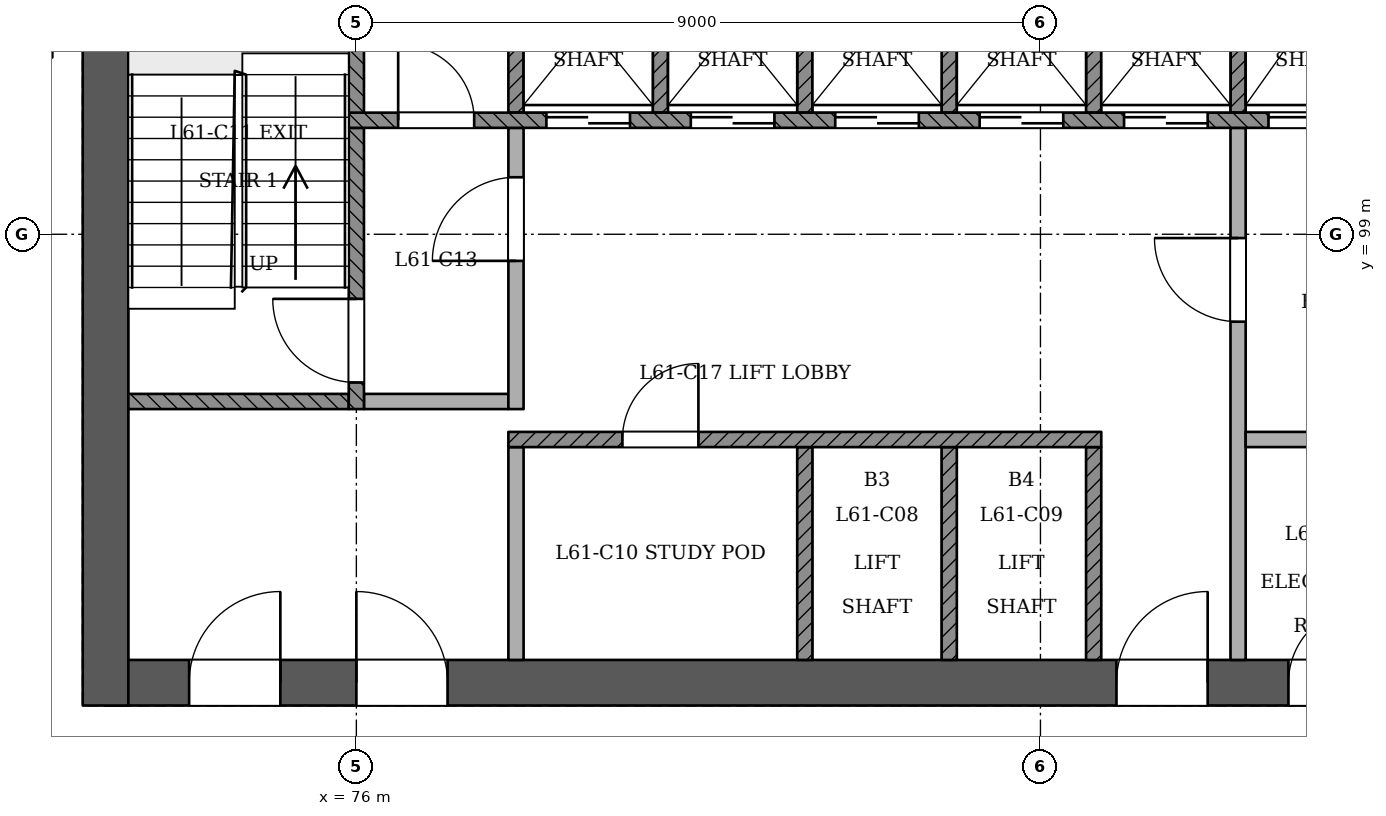
"""IFC4 building model, lengths in metres.
Left out: names, types, materials, properties, quantities, classifications, styles, units other than length and angle.
Written with IfcOpenShell. Run it as: python <this file> out.ifc"""

import sys

from ifc_helpers import new_model, si_unit, direction, frame, frame_2d, origin, place, context, subcontext, project, spatial, rectangle, extrude, element, fill, save


model = new_model("IFC4")
c1 = context("Model", 3, precision=1e-05, world=origin(), true_north=direction((0.0, 1.0)))
c2 = subcontext(c1, "Body", "Model", "MODEL_VIEW")
j1 = project(units=[si_unit("LENGTHUNIT", "METRE"), si_unit("PLANEANGLEUNIT", "RADIAN")], contexts=[c1])
p1 = place(None, origin())
s1 = spatial("IfcSite", under=j1, at=p1, CompositionType="ELEMENT")
p2 = place(p1, origin())
s2 = spatial("IfcBuilding", under=s1, at=p2, CompositionType="ELEMENT")
p3 = place(p2, frame((0.0, 0.0, 239.2)))
s3 = spatial("IfcBuildingStorey", under=s2, at=p3, CompositionType="ELEMENT", Elevation=239.2)
p4 = place(p3, frame((72.7, 93.1, 0.0), z_axis=(0.0, 0.0, 1.0), x_axis=(1.0, 0.0, 0.0)))
e1 = element("IfcWall", 1, at=p4, inside=s3, PredefinedType="SHEAR", context=c2, shape_type="SweptSolid", body=[
    extrude(rectangle(XDim=24.9, YDim=0.6, at=frame_2d((12.45, 0.0))), origin(), (0.0, 0.0, 1.0), 3.6),
])
p5 = place(p4, frame((1.1, 0.0, 0.0)))
e2 = element("IfcOpeningElement", 2, at=p5, cuts=e1, PredefinedType="OPENING", context=c2, shape_type="SweptSolid", body=[
    extrude(rectangle(XDim=1.2, YDim=2.1, at=frame_2d((0.6, 1.05))), frame((0.0, 0.311, 0.0), z_axis=(0.0, -1.0, 0.0), x_axis=(1.0, 0.0, 0.0)), (0.0, 0.0, 1.0), 0.621),
])
p6 = place(p4, frame((3.3, 0.0, 0.0)))
e3 = element("IfcOpeningElement", 3, at=p6, cuts=e1, PredefinedType="OPENING", context=c2, shape_type="SweptSolid", body=[
    extrude(rectangle(XDim=1.2, YDim=2.1, at=frame_2d((0.6, 1.05))), frame((0.0, 0.311, 0.0), z_axis=(0.0, -1.0, 0.0), x_axis=(1.0, 0.0, 0.0)), (0.0, 0.0, 1.0), 0.621),
])
p7 = place(p4, frame((13.3, 0.0, 0.0)))
e4 = element("IfcOpeningElement", 4, at=p7, cuts=e1, PredefinedType="OPENING", context=c2, shape_type="SweptSolid", body=[
    extrude(rectangle(XDim=1.2, YDim=2.1, at=frame_2d((0.6, 1.05))), frame((0.0, 0.311, 0.0), z_axis=(0.0, -1.0, 0.0), x_axis=(1.0, 0.0, 0.0)), (0.0, 0.0, 1.0), 0.621),
])
p8 = place(p4, frame((15.562, 0.0, 0.0)))
e5 = element("IfcOpeningElement", 5, at=p8, cuts=e1, PredefinedType="OPENING", context=c2, shape_type="SweptSolid", body=[
    extrude(rectangle(XDim=1.0, YDim=2.1, at=frame_2d((0.5, 1.05))), frame((0.0, 0.311, 0.0), z_axis=(0.0, -1.0, 0.0), x_axis=(1.0, 0.0, 0.0)), (0.0, 0.0, 1.0), 0.621),
])
p9 = place(p4, frame((18.2, 0.0, 0.0)))
e6 = element("IfcOpeningElement", 6, at=p9, cuts=e1, PredefinedType="OPENING", context=c2, shape_type="SweptSolid", body=[
    extrude(rectangle(XDim=1.0, YDim=2.1, at=frame_2d((0.5, 1.05))), frame((0.0, 0.311, 0.0), z_axis=(0.0, -1.0, 0.0), x_axis=(1.0, 0.0, 0.0)), (0.0, 0.0, 1.0), 0.621),
])
p10 = place(p4, frame((21.788, 0.0, 0.0)))
e7 = element("IfcOpeningElement", 7, at=p10, cuts=e1, PredefinedType="OPENING", context=c2, shape_type="SweptSolid", body=[
    extrude(rectangle(XDim=1.0, YDim=2.1, at=frame_2d((0.5, 1.05))), frame((0.0, 0.311, 0.0), z_axis=(0.0, -1.0, 0.0), x_axis=(1.0, 0.0, 0.0)), (0.0, 0.0, 1.0), 0.621),
])
p11 = place(p3, frame((72.7, 103.7, 0.0), z_axis=(0.0, 0.0, 1.0), x_axis=(0.0, -1.0, 0.0)))
e8 = element("IfcWall", 8, at=p11, inside=s3, PredefinedType="SHEAR", context=c2, shape_type="SweptSolid", body=[
    extrude(rectangle(XDim=10.9, YDim=0.6, at=frame_2d((5.45, 0.0))), origin(), (0.0, 0.0, 1.0), 3.6),
])
p12 = place(p3, frame((72.0, 101.4, 0.0), z_axis=(0.0, 0.0, 1.0), x_axis=(-1.0, 0.0, 0.0)))
e9 = element("IfcWall", 9, at=p12, inside=s3, PredefinedType="PARTITIONING", context=c2, shape_type="SweptSolid", body=[
    extrude(rectangle(XDim=1.8, YDim=0.15, at=frame_2d((0.9, 0.0))), origin(), (0.0, 0.0, 1.0), 3.2),
])
p13 = place(p3, frame((78.1, 93.4, 0.0), z_axis=(0.0, 0.0, 1.0), x_axis=(0.0, 1.0, 0.0)))
e10 = element("IfcWall", 10, at=p13, inside=s3, PredefinedType="PARTITIONING", context=c2, shape_type="SweptSolid", body=[
    extrude(rectangle(XDim=2.8, YDim=0.2, at=frame_2d((1.4, 0.0))), origin(), (0.0, 0.0, 1.0), 3.2),
])
for number, where, z_axis, x_axis in (
    (11, (81.9, 93.4, 0.0), (0.0, 0.0, 1.0), (0.0, 1.0, 0.0)),
    (12, (83.8, 93.4, 0.0), (0.0, 0.0, 1.0), (0.0, 1.0, 0.0)),
    (13, (85.7, 93.4, 0.0), (0.0, 0.0, 1.0), (0.0, 1.0, 0.0)),
):
    element("IfcWall", number, at=place(p3, frame(where, z_axis=z_axis, x_axis=x_axis)), inside=s3, PredefinedType="SOLIDWALL", context=c2, shape_type="SweptSolid", body=[
        extrude(rectangle(XDim=2.8, YDim=0.2, at=frame_2d((1.4, 0.0))), origin(), (0.0, 0.0, 1.0), 3.2),
    ])
p14 = place(p3, frame((87.6, 93.4, 0.0), z_axis=(0.0, 0.0, 1.0), x_axis=(0.0, 1.0, 0.0)))
e14 = element("IfcWall", 14, at=p14, inside=s3, PredefinedType="PARTITIONING", context=c2, shape_type="SweptSolid", body=[
    extrude(rectangle(XDim=7.0, YDim=0.2, at=frame_2d((3.5, 0.0))), origin(), (0.0, 0.0, 1.0), 3.2),
])
p15 = place(p14, frame((4.45, 0.0, 0.0)))
e15 = element("IfcOpeningElement", 15, at=p15, cuts=e14, PredefinedType="OPENING", context=c2, shape_type="SweptSolid", body=[
    extrude(rectangle(XDim=1.1, YDim=2.1, at=frame_2d((0.55, 1.05))), frame((0.0, 0.11, 0.0), z_axis=(0.0, -1.0, 0.0), x_axis=(1.0, 0.0, 0.0)), (0.0, 0.0, 1.0), 0.221),
])
p16 = place(p3, frame((78.0, 96.3, 0.0), z_axis=(0.0, 0.0, 1.0), x_axis=(1.0, 0.0, 0.0)))
e16 = element("IfcWall", 16, at=p16, inside=s3, PredefinedType="SOLIDWALL", context=c2, shape_type="SweptSolid", body=[
    extrude(rectangle(XDim=7.8, YDim=0.2, at=frame_2d((3.9, 0.0))), origin(), (0.0, 0.0, 1.0), 3.2),
])
p17 = place(p16, frame((1.5, 0.0, 0.0)))
e17 = element("IfcOpeningElement", 17, at=p17, cuts=e16, PredefinedType="OPENING", context=c2, shape_type="SweptSolid", body=[
    extrude(rectangle(XDim=1.0, YDim=2.1, at=frame_2d((0.5, 1.05))), frame((0.0, 0.11, 0.0), z_axis=(0.0, -1.0, 0.0), x_axis=(1.0, 0.0, 0.0)), (0.0, 0.0, 1.0), 0.221),
])
p18 = place(p3, frame((87.7, 96.3, 0.0), z_axis=(0.0, 0.0, 1.0), x_axis=(1.0, 0.0, 0.0)))
e18 = element("IfcWall", 18, at=p18, inside=s3, PredefinedType="PARTITIONING", context=c2, shape_type="SweptSolid", body=[
    extrude(rectangle(XDim=3.6, YDim=0.2, at=frame_2d((1.8, 0.0))), origin(), (0.0, 0.0, 1.0), 3.2),
])
p19 = place(p3, frame((73.0, 96.8, 0.0), z_axis=(0.0, 0.0, 1.0), x_axis=(1.0, 0.0, 0.0)))
e19 = element("IfcWall", 19, at=p19, inside=s3, PredefinedType="SOLIDWALL", context=c2, shape_type="SweptSolid", body=[
    extrude(rectangle(XDim=2.9, YDim=0.2, at=frame_2d((1.45, 0.0))), origin(), (0.0, 0.0, 1.0), 3.2),
])
p20 = place(p3, frame((76.0, 96.7, 0.0), z_axis=(0.0, 0.0, 1.0), x_axis=(0.0, 1.0, 0.0)))
e20 = element("IfcWall", 20, at=p20, inside=s3, PredefinedType="SOLIDWALL", context=c2, shape_type="SweptSolid", body=[
    extrude(rectangle(XDim=3.7, YDim=0.2, at=frame_2d((1.85, 0.0))), origin(), (0.0, 0.0, 1.0), 3.2),
])
p21 = place(p20, frame((0.35, 0.0, 0.0)))
e21 = element("IfcOpeningElement", 21, at=p21, cuts=e20, PredefinedType="OPENING", context=c2, shape_type="SweptSolid", body=[
    extrude(rectangle(XDim=1.1, YDim=2.1, at=frame_2d((0.55, 1.05))), frame((0.0, 0.11, 0.0), z_axis=(0.0, -1.0, 0.0), x_axis=(1.0, 0.0, 0.0)), (0.0, 0.0, 1.0), 0.221),
])
p22 = place(p3, frame((76.1, 96.8, 0.0), z_axis=(0.0, 0.0, 1.0), x_axis=(1.0, 0.0, 0.0)))
e22 = element("IfcWall", 22, at=p22, inside=s3, PredefinedType="PARTITIONING", context=c2, shape_type="SweptSolid", body=[
    extrude(rectangle(XDim=1.9, YDim=0.2, at=frame_2d((0.95, 0.0))), origin(), (0.0, 0.0, 1.0), 3.2),
])
p23 = place(p3, frame((78.1, 96.7, 0.0), z_axis=(0.0, 0.0, 1.0), x_axis=(0.0, 1.0, 0.0)))
e23 = element("IfcWall", 23, at=p23, inside=s3, PredefinedType="PARTITIONING", context=c2, shape_type="SweptSolid", body=[
    extrude(rectangle(XDim=3.7, YDim=0.2, at=frame_2d((1.85, 0.0))), origin(), (0.0, 0.0, 1.0), 3.2),
])
p24 = place(p23, frame((1.95, 0.0, 0.0)))
e24 = element("IfcOpeningElement", 24, at=p24, cuts=e23, PredefinedType="OPENING", context=c2, shape_type="SweptSolid", body=[
    extrude(rectangle(XDim=1.1, YDim=2.1, at=frame_2d((0.55, 1.05))), frame((0.0, 0.11, 0.0), z_axis=(0.0, -1.0, 0.0), x_axis=(1.0, 0.0, 0.0)), (0.0, 0.0, 1.0), 0.221),
])
p25 = place(p3, frame((75.9, 100.5, 0.0), z_axis=(0.0, 0.0, 1.0), x_axis=(1.0, 0.0, 0.0)))
e25 = element("IfcWall", 25, at=p25, inside=s3, PredefinedType="SOLIDWALL", context=c2, shape_type="SweptSolid", body=[
    extrude(rectangle(XDim=18.2, YDim=0.2, at=frame_2d((9.1, 0.0))), origin(), (0.0, 0.0, 1.0), 3.2),
])
p26 = place(p25, frame((2.6, 0.0, 0.0)))
e26 = element("IfcOpeningElement", 26, at=p26, cuts=e25, PredefinedType="OPENING", context=c2, shape_type="SweptSolid", body=[
    extrude(rectangle(XDim=1.1, YDim=2.1, at=frame_2d((0.55, 1.05))), frame((0.0, 0.11, 0.0), z_axis=(0.0, -1.0, 0.0), x_axis=(1.0, 0.0, 0.0)), (0.0, 0.0, 1.0), 0.221),
])
p27 = place(p25, frame((4.5, 0.0, 0.0)))
e27 = element("IfcOpeningElement", 27, at=p27, cuts=e25, PredefinedType="OPENING", context=c2, shape_type="SweptSolid", body=[
    extrude(rectangle(XDim=1.1, YDim=2.1, at=frame_2d((0.55, 1.05))), frame((0.0, 0.11, 0.0), z_axis=(0.0, -1.0, 0.0), x_axis=(1.0, 0.0, 0.0)), (0.0, 0.0, 1.0), 0.221),
])
p28 = place(p25, frame((6.4, 0.0, 0.0)))
e28 = element("IfcOpeningElement", 28, at=p28, cuts=e25, PredefinedType="OPENING", context=c2, shape_type="SweptSolid", body=[
    extrude(rectangle(XDim=1.1, YDim=2.1, at=frame_2d((0.55, 1.05))), frame((0.0, 0.11, 0.0), z_axis=(0.0, -1.0, 0.0), x_axis=(1.0, 0.0, 0.0)), (0.0, 0.0, 1.0), 0.221),
])
p29 = place(p25, frame((8.3, 0.0, 0.0)))
e29 = element("IfcOpeningElement", 29, at=p29, cuts=e25, PredefinedType="OPENING", context=c2, shape_type="SweptSolid", body=[
    extrude(rectangle(XDim=1.1, YDim=2.1, at=frame_2d((0.55, 1.05))), frame((0.0, 0.11, 0.0), z_axis=(0.0, -1.0, 0.0), x_axis=(1.0, 0.0, 0.0)), (0.0, 0.0, 1.0), 0.221),
])
p30 = place(p25, frame((10.2, 0.0, 0.0)))
e30 = element("IfcOpeningElement", 30, at=p30, cuts=e25, PredefinedType="OPENING", context=c2, shape_type="SweptSolid", body=[
    extrude(rectangle(XDim=1.1, YDim=2.1, at=frame_2d((0.55, 1.05))), frame((0.0, 0.11, 0.0), z_axis=(0.0, -1.0, 0.0), x_axis=(1.0, 0.0, 0.0)), (0.0, 0.0, 1.0), 0.221),
])
p31 = place(p25, frame((12.1, 0.0, 0.0)))
e31 = element("IfcOpeningElement", 31, at=p31, cuts=e25, PredefinedType="OPENING", context=c2, shape_type="SweptSolid", body=[
    extrude(rectangle(XDim=1.1, YDim=2.1, at=frame_2d((0.55, 1.05))), frame((0.0, 0.11, 0.0), z_axis=(0.0, -1.0, 0.0), x_axis=(1.0, 0.0, 0.0)), (0.0, 0.0, 1.0), 0.221),
])
p32 = place(p25, frame((14.0, 0.0, 0.0)))
e32 = element("IfcOpeningElement", 32, at=p32, cuts=e25, PredefinedType="OPENING", context=c2, shape_type="SweptSolid", body=[
    extrude(rectangle(XDim=1.1, YDim=2.1, at=frame_2d((0.55, 1.05))), frame((0.0, 0.11, 0.0), z_axis=(0.0, -1.0, 0.0), x_axis=(1.0, 0.0, 0.0)), (0.0, 0.0, 1.0), 0.221),
])
p33 = place(p25, frame((0.65, 0.0, 0.0)))
e33 = element("IfcOpeningElement", 33, at=p33, cuts=e25, PredefinedType="OPENING", context=c2, shape_type="SweptSolid", body=[
    extrude(rectangle(XDim=1.0, YDim=2.1, at=frame_2d((0.5, 1.05))), frame((0.0, 0.11, 0.0), z_axis=(0.0, -1.0, 0.0), x_axis=(1.0, 0.0, 0.0)), (0.0, 0.0, 1.0), 0.221),
])
p34 = place(p25, frame((16.3, 0.0, 0.0)))
e34 = element("IfcOpeningElement", 34, at=p34, cuts=e25, PredefinedType="OPENING", context=c2, shape_type="SweptSolid", body=[
    extrude(rectangle(XDim=1.0, YDim=2.1, at=frame_2d((0.5, 1.05))), frame((0.0, 0.11, 0.0), z_axis=(0.0, -1.0, 0.0), x_axis=(1.0, 0.0, 0.0)), (0.0, 0.0, 1.0), 0.221),
])
for number, where, z_axis, x_axis in (
    (35, (76.0, 100.6, 0.0), (0.0, 0.0, 1.0), (0.0, 1.0, 0.0)),
    (36, (78.1, 100.6, 0.0), (0.0, 0.0, 1.0), (0.0, 1.0, 0.0)),
    (37, (80.0, 100.6, 0.0), (0.0, 0.0, 1.0), (0.0, 1.0, 0.0)),
    (38, (81.9, 100.6, 0.0), (0.0, 0.0, 1.0), (0.0, 1.0, 0.0)),
    (39, (83.8, 100.6, 0.0), (0.0, 0.0, 1.0), (0.0, 1.0, 0.0)),
    (40, (85.7, 100.6, 0.0), (0.0, 0.0, 1.0), (0.0, 1.0, 0.0)),
    (41, (87.6, 100.6, 0.0), (0.0, 0.0, 1.0), (0.0, 1.0, 0.0)),
):
    element("IfcWall", number, at=place(p3, frame(where, z_axis=z_axis, x_axis=x_axis)), inside=s3, PredefinedType="SOLIDWALL", context=c2, shape_type="SweptSolid", body=[
        extrude(rectangle(XDim=2.8, YDim=0.2, at=frame_2d((1.4, 0.0))), origin(), (0.0, 0.0, 1.0), 3.2),
    ])
p35 = place(p26, origin())
e42 = element("IfcDoor", 42, at=p35, inside=s3, OperationType="SLIDING_TO_RIGHT", PredefinedType="NOTDEFINED", context=c2, shape_type="SweptSolid", body=[
    extrude(rectangle(XDim=1.1, YDim=2.1, at=frame_2d((0.55, 1.05))), frame((0.0, 0.025, 0.0), z_axis=(0.0, -1.0, 0.0), x_axis=(1.0, 0.0, 0.0)), (0.0, 0.0, 1.0), 0.05),
])
fill(e26, e42)
p36 = place(p27, origin())
e43 = element("IfcDoor", 43, at=p36, inside=s3, OperationType="SLIDING_TO_LEFT", PredefinedType="NOTDEFINED", context=c2, shape_type="SweptSolid", body=[
    extrude(rectangle(XDim=1.1, YDim=2.1, at=frame_2d((0.55, 1.05))), frame((0.0, 0.025, 0.0), z_axis=(0.0, -1.0, 0.0), x_axis=(1.0, 0.0, 0.0)), (0.0, 0.0, 1.0), 0.05),
])
fill(e27, e43)
p37 = place(p28, origin())
e44 = element("IfcDoor", 44, at=p37, inside=s3, OperationType="SLIDING_TO_RIGHT", PredefinedType="NOTDEFINED", context=c2, shape_type="SweptSolid", body=[
    extrude(rectangle(XDim=1.1, YDim=2.1, at=frame_2d((0.55, 1.05))), frame((0.0, 0.025, 0.0), z_axis=(0.0, -1.0, 0.0), x_axis=(1.0, 0.0, 0.0)), (0.0, 0.0, 1.0), 0.05),
])
fill(e28, e44)
p38 = place(p29, origin())
e45 = element("IfcDoor", 45, at=p38, inside=s3, OperationType="SLIDING_TO_LEFT", PredefinedType="NOTDEFINED", context=c2, shape_type="SweptSolid", body=[
    extrude(rectangle(XDim=1.1, YDim=2.1, at=frame_2d((0.55, 1.05))), frame((0.0, 0.025, 0.0), z_axis=(0.0, -1.0, 0.0), x_axis=(1.0, 0.0, 0.0)), (0.0, 0.0, 1.0), 0.05),
])
fill(e29, e45)
p39 = place(p30, origin())
e46 = element("IfcDoor", 46, at=p39, inside=s3, OperationType="SLIDING_TO_RIGHT", PredefinedType="NOTDEFINED", context=c2, shape_type="SweptSolid", body=[
    extrude(rectangle(XDim=1.1, YDim=2.1, at=frame_2d((0.55, 1.05))), frame((0.0, 0.025, 0.0), z_axis=(0.0, -1.0, 0.0), x_axis=(1.0, 0.0, 0.0)), (0.0, 0.0, 1.0), 0.05),
])
fill(e30, e46)
p40 = place(p31, origin())
e47 = element("IfcDoor", 47, at=p40, inside=s3, OperationType="SLIDING_TO_RIGHT", PredefinedType="NOTDEFINED", context=c2, shape_type="SweptSolid", body=[
    extrude(rectangle(XDim=1.1, YDim=2.1, at=frame_2d((0.55, 1.05))), frame((0.0, 0.025, 0.0), z_axis=(0.0, -1.0, 0.0), x_axis=(1.0, 0.0, 0.0)), (0.0, 0.0, 1.0), 0.05),
])
fill(e31, e47)
p41 = place(p21, origin())
e48 = element("IfcDoor", 48, at=p41, inside=s3, OperationType="SINGLE_SWING_RIGHT", PredefinedType="NOTDEFINED", context=c2, shape_type="SweptSolid", body=[
    extrude(rectangle(XDim=1.1, YDim=2.1, at=frame_2d((0.55, 1.05))), frame((0.0, 0.025, 0.0), z_axis=(0.0, -1.0, 0.0), x_axis=(1.0, 0.0, 0.0)), (0.0, 0.0, 1.0), 0.05),
])
fill(e21, e48)
p42 = place(p24, origin())
e49 = element("IfcDoor", 49, at=p42, inside=s3, OperationType="SINGLE_SWING_LEFT", PredefinedType="NOTDEFINED", context=c2, shape_type="SweptSolid", body=[
    extrude(rectangle(XDim=1.1, YDim=2.1, at=frame_2d((0.55, 1.05))), frame((0.0, 0.025, 0.0), z_axis=(0.0, -1.0, 0.0), x_axis=(1.0, 0.0, 0.0)), (0.0, 0.0, 1.0), 0.05),
])
fill(e24, e49)
p43 = place(p15, origin())
e50 = element("IfcDoor", 50, at=p43, inside=s3, OperationType="SINGLE_SWING_RIGHT", PredefinedType="NOTDEFINED", context=c2, shape_type="SweptSolid", body=[
    extrude(rectangle(XDim=1.1, YDim=2.1, at=frame_2d((0.55, 1.05))), frame((0.0, 0.025, 0.0), z_axis=(0.0, -1.0, 0.0), x_axis=(1.0, 0.0, 0.0)), (0.0, 0.0, 1.0), 0.05),
])
fill(e15, e50)
p44 = place(p5, origin())
e51 = element("IfcDoor", 51, at=p44, inside=s3, OperationType="SINGLE_SWING_RIGHT", PredefinedType="NOTDEFINED", context=c2, shape_type="SweptSolid", body=[
    extrude(rectangle(XDim=1.2, YDim=2.1, at=frame_2d((0.6, 1.05))), frame((0.0, 0.025, 0.0), z_axis=(0.0, -1.0, 0.0), x_axis=(1.0, 0.0, 0.0)), (0.0, 0.0, 1.0), 0.05),
])
fill(e2, e51)
p45 = place(p6, origin())
e52 = element("IfcDoor", 52, at=p45, inside=s3, OperationType="SINGLE_SWING_LEFT", PredefinedType="NOTDEFINED", context=c2, shape_type="SweptSolid", body=[
    extrude(rectangle(XDim=1.2, YDim=2.1, at=frame_2d((0.6, 1.05))), frame((0.0, 0.025, 0.0), z_axis=(0.0, -1.0, 0.0), x_axis=(1.0, 0.0, 0.0)), (0.0, 0.0, 1.0), 0.05),
])
fill(e3, e52)
p46 = place(p7, origin())
e53 = element("IfcDoor", 53, at=p46, inside=s3, OperationType="SINGLE_SWING_RIGHT", PredefinedType="NOTDEFINED", context=c2, shape_type="SweptSolid", body=[
    extrude(rectangle(XDim=1.2, YDim=2.1, at=frame_2d((0.6, 1.05))), frame((0.0, 0.025, 0.0), z_axis=(0.0, -1.0, 0.0), x_axis=(1.0, 0.0, 0.0)), (0.0, 0.0, 1.0), 0.05),
])
fill(e4, e53)
p47 = place(p33, origin())
e54 = element("IfcDoor", 54, at=p47, inside=s3, OperationType="SINGLE_SWING_LEFT", PredefinedType="NOTDEFINED", context=c2, shape_type="SweptSolid", body=[
    extrude(rectangle(XDim=1.0, YDim=2.1, at=frame_2d((0.5, 1.05))), frame((0.0, 0.025, 0.0), z_axis=(0.0, -1.0, 0.0), x_axis=(1.0, 0.0, 0.0)), (0.0, 0.0, 1.0), 0.05),
])
fill(e33, e54)
p48 = place(p8, origin())
e55 = element("IfcDoor", 55, at=p48, inside=s3, OperationType="SINGLE_SWING_RIGHT", PredefinedType="NOTDEFINED", context=c2, shape_type="SweptSolid", body=[
    extrude(rectangle(XDim=1.0, YDim=2.1, at=frame_2d((0.5, 1.05))), frame((0.0, 0.025, 0.0), z_axis=(0.0, -1.0, 0.0), x_axis=(1.0, 0.0, 0.0)), (0.0, 0.0, 1.0), 0.05),
])
fill(e5, e55)
p49 = place(p17, origin())
e56 = element("IfcDoor", 56, at=p49, inside=s3, OperationType="SINGLE_SWING_RIGHT", PredefinedType="NOTDEFINED", context=c2, shape_type="SweptSolid", body=[
    extrude(rectangle(XDim=1.0, YDim=2.1, at=frame_2d((0.5, 1.05))), frame((0.0, 0.025, 0.0), z_axis=(0.0, -1.0, 0.0), x_axis=(1.0, 0.0, 0.0)), (0.0, 0.0, 1.0), 0.05),
])
fill(e17, e56)
save(model, sys.argv[1])
